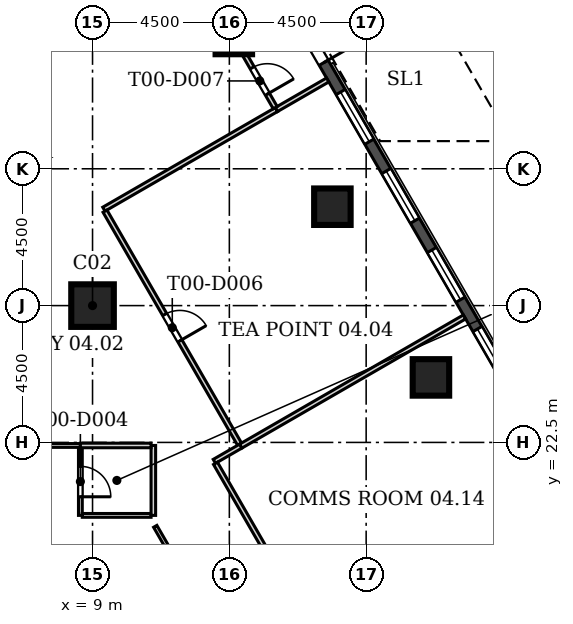
"""IFC4 building model, lengths in metres.
Left out: names, types, materials, properties, quantities, classifications, styles, units other than length and angle.
Written with IfcOpenShell. Run it as: python <this file> out.ifc"""

import sys

from ifc_helpers import new_model, si_unit, direction, frame, frame_2d, origin, origin_2d, place, context, subcontext, project, spatial, rectangle, hollow_rectangle, extrude, element, fill, save


model = new_model("IFC4")
c1 = context("Model", 3, precision=1e-05, world=origin(), true_north=direction((0.0, 1.0)))
c2 = subcontext(c1, "Body", "Model", "MODEL_VIEW")
j1 = project(units=[si_unit("LENGTHUNIT", "METRE"), si_unit("PLANEANGLEUNIT", "RADIAN")], contexts=[c1])
p1 = place(None, origin())
s1 = spatial("IfcSite", under=j1, at=p1, CompositionType="ELEMENT")
p2 = place(p1, origin())
s2 = spatial("IfcBuilding", under=s1, at=p2, CompositionType="ELEMENT")
p3 = place(p2, frame((0.0, 0.0, 25.0)))
s3 = spatial("IfcBuildingStorey", under=s2, at=p3, CompositionType="ELEMENT", Elevation=25.0)
for number, where, z_axis, x_axis in (
    (1, (20.131, 24.638, 0.0), (0.0, 0.0, 1.0), (1.0, 0.0, 0.0)),
    (2, (16.889, 30.253, 0.0), (0.0, 0.0, 1.0), (1.0, 0.0, 0.0)),
    (3, (13.648, 35.868, 0.0), (0.0, 0.0, 1.0), (1.0, 0.0, 0.0)),
):
    element("IfcColumn", number, at=place(p3, frame(where, z_axis=z_axis, x_axis=x_axis)), inside=s3, PredefinedType="COLUMN", context=c2, shape_type="SweptSolid", body=[
        extrude(rectangle(XDim=1.2, YDim=1.2, at=origin_2d()), origin(), (0.0, 0.0, 1.0), 4.5),
    ])
p4 = place(p3, frame((9.0, 27.0, 0.0), z_axis=(0.0, 0.0, 1.0), x_axis=(1.0, 0.0, 0.0)))
e4 = element("IfcColumn", 4, at=p4, inside=s3, PredefinedType="COLUMN", context=c2, shape_type="SweptSolid", body=[
    extrude(rectangle(XDim=1.4, YDim=1.4, at=origin_2d()), origin(), (0.0, 0.0, 1.0), 4.5),
])
p5 = place(p3, frame((32.353, 7.709, 0.0), z_axis=(0.0, 0.0, 1.0), x_axis=(-0.500000836325, 0.866024920931, 0.0)))
e5 = element("IfcWall", 5, at=p5, inside=s3, PredefinedType="SOLIDWALL", context=c2, shape_type="SweptSolid", body=[
    extrude(rectangle(XDim=56.0, YDim=0.34, at=frame_2d((28.0, 0.0))), origin(), (0.0, 0.0, 1.0), 4.2),
])
p6 = place(p5, frame((1.5, 0.0, 0.9)))
e6 = element("IfcOpeningElement", 6, at=p6, cuts=e5, PredefinedType="OPENING", context=c2, shape_type="SweptSolid", body=[
    extrude(rectangle(XDim=1.885, YDim=3.0, at=frame_2d((0.942, 1.5))), frame((0.0, 0.18, 0.0), z_axis=(0.0, -1.0, 0.0), x_axis=(1.0, 0.0, 0.0)), (0.0, 0.0, 1.0), 0.36),
])
p7 = place(p5, frame((4.5, 0.0, 0.9)))
e7 = element("IfcOpeningElement", 7, at=p7, cuts=e5, PredefinedType="OPENING", context=c2, shape_type="SweptSolid", body=[
    extrude(rectangle(XDim=1.885, YDim=3.0, at=frame_2d((0.942, 1.5))), frame((0.0, 0.18, 0.0), z_axis=(0.0, -1.0, 0.0), x_axis=(1.0, 0.0, 0.0)), (0.0, 0.0, 1.0), 0.36),
])
p8 = place(p5, frame((7.5, 0.0, 0.9)))
e8 = element("IfcOpeningElement", 8, at=p8, cuts=e5, PredefinedType="OPENING", context=c2, shape_type="SweptSolid", body=[
    extrude(rectangle(XDim=1.885, YDim=3.0, at=frame_2d((0.942, 1.5))), frame((0.0, 0.18, 0.0), z_axis=(0.0, -1.0, 0.0), x_axis=(1.0, 0.0, 0.0)), (0.0, 0.0, 1.0), 0.36),
])
p9 = place(p5, frame((10.5, 0.0, 0.9)))
e9 = element("IfcOpeningElement", 9, at=p9, cuts=e5, PredefinedType="OPENING", context=c2, shape_type="SweptSolid", body=[
    extrude(rectangle(XDim=1.885, YDim=3.0, at=frame_2d((0.942, 1.5))), frame((0.0, 0.18, 0.0), z_axis=(0.0, -1.0, 0.0), x_axis=(1.0, 0.0, 0.0)), (0.0, 0.0, 1.0), 0.36),
])
p10 = place(p5, frame((13.5, 0.0, 0.9)))
e10 = element("IfcOpeningElement", 10, at=p10, cuts=e5, PredefinedType="OPENING", context=c2, shape_type="SweptSolid", body=[
    extrude(rectangle(XDim=1.885, YDim=3.0, at=frame_2d((0.942, 1.5))), frame((0.0, 0.18, 0.0), z_axis=(0.0, -1.0, 0.0), x_axis=(1.0, 0.0, 0.0)), (0.0, 0.0, 1.0), 0.36),
])
p11 = place(p5, frame((16.5, 0.0, 0.9)))
e11 = element("IfcOpeningElement", 11, at=p11, cuts=e5, PredefinedType="OPENING", context=c2, shape_type="SweptSolid", body=[
    extrude(rectangle(XDim=1.885, YDim=3.0, at=frame_2d((0.942, 1.5))), frame((0.0, 0.18, 0.0), z_axis=(0.0, -1.0, 0.0), x_axis=(1.0, 0.0, 0.0)), (0.0, 0.0, 1.0), 0.36),
])
p12 = place(p5, frame((19.5, 0.0, 0.9)))
e12 = element("IfcOpeningElement", 12, at=p12, cuts=e5, PredefinedType="OPENING", context=c2, shape_type="SweptSolid", body=[
    extrude(rectangle(XDim=1.885, YDim=3.0, at=frame_2d((0.942, 1.5))), frame((0.0, 0.18, 0.0), z_axis=(0.0, -1.0, 0.0), x_axis=(1.0, 0.0, 0.0)), (0.0, 0.0, 1.0), 0.36),
])
p13 = place(p5, frame((22.5, 0.0, 0.9)))
e13 = element("IfcOpeningElement", 13, at=p13, cuts=e5, PredefinedType="OPENING", context=c2, shape_type="SweptSolid", body=[
    extrude(rectangle(XDim=1.885, YDim=3.0, at=frame_2d((0.942, 1.5))), frame((0.0, 0.18, 0.0), z_axis=(0.0, -1.0, 0.0), x_axis=(1.0, 0.0, 0.0)), (0.0, 0.0, 1.0), 0.36),
])
p14 = place(p5, frame((25.5, 0.0, 0.9)))
e14 = element("IfcOpeningElement", 14, at=p14, cuts=e5, PredefinedType="OPENING", context=c2, shape_type="SweptSolid", body=[
    extrude(rectangle(XDim=1.885, YDim=3.0, at=frame_2d((0.942, 1.5))), frame((0.0, 0.18, 0.0), z_axis=(0.0, -1.0, 0.0), x_axis=(1.0, 0.0, 0.0)), (0.0, 0.0, 1.0), 0.36),
])
p15 = place(p5, frame((28.5, 0.0, 0.9)))
e15 = element("IfcOpeningElement", 15, at=p15, cuts=e5, PredefinedType="OPENING", context=c2, shape_type="SweptSolid", body=[
    extrude(rectangle(XDim=1.885, YDim=3.0, at=frame_2d((0.942, 1.5))), frame((0.0, 0.18, 0.0), z_axis=(0.0, -1.0, 0.0), x_axis=(1.0, 0.0, 0.0)), (0.0, 0.0, 1.0), 0.36),
])
p16 = place(p5, frame((31.5, 0.0, 0.0)))
e16 = element("IfcOpeningElement", 16, at=p16, cuts=e5, PredefinedType="OPENING", context=c2, shape_type="SweptSolid", body=[
    extrude(rectangle(XDim=1.885, YDim=2.6, at=frame_2d((0.942, 1.3))), frame((0.0, 0.18, 0.0), z_axis=(0.0, -1.0, 0.0), x_axis=(1.0, 0.0, 0.0)), (0.0, 0.0, 1.0), 0.36),
])
p17 = place(p5, frame((34.5, 0.0, 0.9)))
e17 = element("IfcOpeningElement", 17, at=p17, cuts=e5, PredefinedType="OPENING", context=c2, shape_type="SweptSolid", body=[
    extrude(rectangle(XDim=1.885, YDim=3.0, at=frame_2d((0.942, 1.5))), frame((0.0, 0.18, 0.0), z_axis=(0.0, -1.0, 0.0), x_axis=(1.0, 0.0, 0.0)), (0.0, 0.0, 1.0), 0.36),
])
p18 = place(p5, frame((37.5, 0.0, 0.9)))
e18 = element("IfcOpeningElement", 18, at=p18, cuts=e5, PredefinedType="OPENING", context=c2, shape_type="SweptSolid", body=[
    extrude(rectangle(XDim=1.885, YDim=3.0, at=frame_2d((0.942, 1.5))), frame((0.0, 0.18, 0.0), z_axis=(0.0, -1.0, 0.0), x_axis=(1.0, 0.0, 0.0)), (0.0, 0.0, 1.0), 0.36),
])
p19 = place(p5, frame((40.5, 0.0, 0.9)))
e19 = element("IfcOpeningElement", 19, at=p19, cuts=e5, PredefinedType="OPENING", context=c2, shape_type="SweptSolid", body=[
    extrude(rectangle(XDim=1.885, YDim=3.0, at=frame_2d((0.942, 1.5))), frame((0.0, 0.18, 0.0), z_axis=(0.0, -1.0, 0.0), x_axis=(1.0, 0.0, 0.0)), (0.0, 0.0, 1.0), 0.36),
])
p20 = place(p5, frame((43.5, 0.0, 0.9)))
e20 = element("IfcOpeningElement", 20, at=p20, cuts=e5, PredefinedType="OPENING", context=c2, shape_type="SweptSolid", body=[
    extrude(rectangle(XDim=1.885, YDim=3.0, at=frame_2d((0.942, 1.5))), frame((0.0, 0.18, 0.0), z_axis=(0.0, -1.0, 0.0), x_axis=(1.0, 0.0, 0.0)), (0.0, 0.0, 1.0), 0.36),
])
p21 = place(p5, frame((46.5, 0.0, 0.9)))
e21 = element("IfcOpeningElement", 21, at=p21, cuts=e5, PredefinedType="OPENING", context=c2, shape_type="SweptSolid", body=[
    extrude(rectangle(XDim=1.885, YDim=3.0, at=frame_2d((0.942, 1.5))), frame((0.0, 0.18, 0.0), z_axis=(0.0, -1.0, 0.0), x_axis=(1.0, 0.0, 0.0)), (0.0, 0.0, 1.0), 0.36),
])
p22 = place(p5, frame((49.5, 0.0, 0.9)))
e22 = element("IfcOpeningElement", 22, at=p22, cuts=e5, PredefinedType="OPENING", context=c2, shape_type="SweptSolid", body=[
    extrude(rectangle(XDim=1.885, YDim=3.0, at=frame_2d((0.942, 1.5))), frame((0.0, 0.18, 0.0), z_axis=(0.0, -1.0, 0.0), x_axis=(1.0, 0.0, 0.0)), (0.0, 0.0, 1.0), 0.36),
])
p23 = place(p5, frame((52.5, 0.0, 0.9)))
e23 = element("IfcOpeningElement", 23, at=p23, cuts=e5, PredefinedType="OPENING", context=c2, shape_type="SweptSolid", body=[
    extrude(rectangle(XDim=1.885, YDim=3.0, at=frame_2d((0.942, 1.5))), frame((0.0, 0.18, 0.0), z_axis=(0.0, -1.0, 0.0), x_axis=(1.0, 0.0, 0.0)), (0.0, 0.0, 1.0), 0.36),
])
p24 = place(p2, frame((0.0, 0.0, 20.0)))
s4 = spatial("IfcBuildingStorey", under=s2, at=p24, CompositionType="ELEMENT", Elevation=20.0)
for number, where, z_axis, x_axis in (
    (24, (18.623, 32.69, 5.0), (0.0, 0.0, 1.0), (1.0, 0.0, 0.0)),
    (25, (22.158, 32.76, 5.0), (0.0, 0.0, 1.0), (1.0, 0.0, 0.0)),
):
    element("IfcColumn", number, at=place(p24, frame(where, z_axis=z_axis, x_axis=x_axis)), inside=s4, PredefinedType="COLUMN", context=c2, shape_type="SweptSolid", body=[
        extrude(hollow_rectangle(XDim=0.25, YDim=0.25, WallThickness=0.012, at=origin_2d()), origin(), (0.0, 0.0, 1.0), 3.6),
    ])
p25 = place(p3, frame((11.062, 19.74, 0.0), z_axis=(0.0, 0.0, 1.0), x_axis=(0.499995462694, -0.866028023383, 0.0)))
e26 = element("IfcWall", 26, at=p25, inside=s3, PredefinedType="PARTITIONING", context=c2, shape_type="SweptSolid", body=[
    extrude(rectangle(XDim=9.444, YDim=0.125, at=frame_2d((4.722, 0.0))), origin(), (0.0, 0.0, 1.0), 4.2),
])
p26 = place(p25, frame((5.121, 0.0, 0.0)))
e27 = element("IfcOpeningElement", 27, at=p26, cuts=e26, PredefinedType="OPENING", context=c2, shape_type="SweptSolid", body=[
    extrude(rectangle(XDim=1.8, YDim=2.1, at=frame_2d((0.9, 1.05))), frame((0.0, 0.073, 0.0), z_axis=(0.0, -1.0, 0.0), x_axis=(1.0, 0.0, 0.0)), (0.0, 0.0, 1.0), 0.145),
])
p27 = place(p3, frame((-10.938, 22.4, 0.0), z_axis=(0.0, 0.0, 1.0), x_axis=(1.0, 0.0, 0.0)))
e28 = element("IfcWall", 28, at=p27, inside=s3, PredefinedType="PARTITIONING", context=c2, shape_type="SweptSolid", body=[
    extrude(rectangle(XDim=19.538, YDim=0.125, at=frame_2d((9.769, 0.0))), origin(), (0.0, 0.0, 1.0), 4.2),
])
p28 = place(p27, frame((8.869, 0.0, 0.0)))
e29 = element("IfcOpeningElement", 29, at=p28, cuts=e28, PredefinedType="OPENING", context=c2, shape_type="SweptSolid", body=[
    extrude(rectangle(XDim=1.8, YDim=2.1, at=frame_2d((0.9, 1.05))), frame((0.0, 0.073, 0.0), z_axis=(0.0, -1.0, 0.0), x_axis=(1.0, 0.0, 0.0)), (0.0, 0.0, 1.0), 0.145),
])
p29 = place(p3, frame((8.6, 22.324, 0.0), z_axis=(0.0, 0.0, 1.0), x_axis=(0.0, -1.0, 0.0)))
e30 = element("IfcWall", 30, at=p29, inside=s3, PredefinedType="PARTITIONING", context=c2, shape_type="SweptSolid", body=[
    extrude(rectangle(XDim=2.224, YDim=0.125, at=frame_2d((1.112, 0.0))), origin(), (0.0, 0.0, 1.0), 4.2),
])
p30 = place(p29, frame((0.612, 0.0, 0.0)))
e31 = element("IfcOpeningElement", 31, at=p30, cuts=e30, PredefinedType="OPENING", context=c2, shape_type="SweptSolid", body=[
    extrude(rectangle(XDim=1.0, YDim=2.1, at=frame_2d((0.5, 1.05))), frame((0.0, 0.073, 0.0), z_axis=(0.0, -1.0, 0.0), x_axis=(1.0, 0.0, 0.0)), (0.0, 0.0, 1.0), 0.145),
])
p31 = place(p3, frame((8.663, 20.1, 0.0), z_axis=(0.0, 0.0, 1.0), x_axis=(1.0, 0.0, 0.0)))
e32 = element("IfcWall", 32, at=p31, inside=s3, PredefinedType="PARTITIONING", context=c2, shape_type="SweptSolid", body=[
    extrude(rectangle(XDim=2.262, YDim=0.125, at=frame_2d((1.131, 0.0))), origin(), (0.0, 0.0, 1.0), 4.2),
])
p32 = place(p3, frame((15.046, 33.446, 0.0), z_axis=(0.0, 0.0, 1.0), x_axis=(0.866054235095, 0.49995005938, 0.0)))
e33 = element("IfcWall", 33, at=p32, inside=s3, PredefinedType="PARTITIONING", context=c2, shape_type="SweptSolid", body=[
    extrude(rectangle(XDim=1.95, YDim=0.15, at=frame_2d((0.975, 0.0))), origin(), (0.0, 0.0, 1.0), 4.2),
])
p33 = place(p3, frame((9.373, 30.171, 0.0), z_axis=(0.0, 0.0, 1.0), x_axis=(0.866021102686, 0.500007449647, 0.0)))
e34 = element("IfcWall", 34, at=p33, inside=s3, PredefinedType="PARTITIONING", context=c2, shape_type="SweptSolid", body=[
    extrude(rectangle(XDim=6.55, YDim=0.15, at=frame_2d((3.275, 0.0))), origin(), (0.0, 0.0, 1.0), 4.2),
])
p34 = place(p3, frame((13.836, 22.442, 0.0), z_axis=(0.0, 0.0, 1.0), x_axis=(-0.500005027614, 0.86602250107, 0.0)))
e35 = element("IfcWall", 35, at=p34, inside=s3, PredefinedType="PARTITIONING", context=c2, shape_type="SweptSolid", body=[
    extrude(rectangle(XDim=8.85, YDim=0.15, at=frame_2d((4.425, 0.0))), origin(), (0.0, 0.0, 1.0), 4.2),
])
p35 = place(p34, frame((3.925, 0.0, 0.0)))
e36 = element("IfcOpeningElement", 36, at=p35, cuts=e35, PredefinedType="OPENING", context=c2, shape_type="SweptSolid", body=[
    extrude(rectangle(XDim=1.0, YDim=2.1, at=frame_2d((0.5, 1.05))), frame((0.0, 0.085, 0.0), z_axis=(0.0, -1.0, 0.0), x_axis=(1.0, 0.0, 0.0)), (0.0, 0.0, 1.0), 0.17),
])
p36 = place(p3, frame((21.234, 26.627, 0.0), z_axis=(0.0, 0.0, 1.0), x_axis=(-0.866028703517, -0.499994284652, 0.0)))
e37 = element("IfcWall", 37, at=p36, inside=s3, PredefinedType="PARTITIONING", context=c2, shape_type="SweptSolid", body=[
    extrude(rectangle(XDim=8.5, YDim=0.15, at=frame_2d((4.25, 0.0))), origin(), (0.0, 0.0, 1.0), 4.2),
])
p37 = place(p3, frame((15.008, 33.511, 0.0), z_axis=(0.0, 0.0, 1.0), x_axis=(-0.500048947491, 0.865997142093, 0.0)))
e38 = element("IfcWall", 38, at=p37, inside=s3, PredefinedType="PARTITIONING", context=c2, shape_type="SweptSolid", body=[
    extrude(rectangle(XDim=2.028, YDim=0.15, at=frame_2d((1.014, 0.0))), origin(), (0.0, 0.0, 1.0), 3.4),
])
p38 = place(p37, frame((0.514, 0.0, 0.0)))
e39 = element("IfcOpeningElement", 39, at=p38, cuts=e38, PredefinedType="OPENING", context=c2, shape_type="SweptSolid", body=[
    extrude(rectangle(XDim=1.0, YDim=2.1, at=frame_2d((0.5, 1.05))), frame((0.0, 0.085, 0.0), z_axis=(0.0, -1.0, 0.0), x_axis=(1.0, 0.0, 0.0)), (0.0, 0.0, 1.0), 0.17),
])
p39 = place(p3, frame((13.873, 22.377, 0.0), z_axis=(0.0, 0.0, 1.0), x_axis=(-0.866010750942, -0.50002537861, 0.0)))
e40 = element("IfcWall", 40, at=p39, inside=s3, PredefinedType="PARTITIONING", context=c2, shape_type="SweptSolid", body=[
    extrude(rectangle(XDim=1.0, YDim=0.15, at=frame_2d((0.5, 0.0))), origin(), (0.0, 0.0, 1.0), 4.2),
])
p40 = place(p3, frame((13.045, 21.812, 0.0), z_axis=(0.0, 0.0, 1.0), x_axis=(0.499994727438, -0.866028447878, 0.0)))
e41 = element("IfcWall", 41, at=p40, inside=s3, PredefinedType="PARTITIONING", context=c2, shape_type="SweptSolid", body=[
    extrude(rectangle(XDim=11.85, YDim=0.15, at=frame_2d((5.925, 0.0))), origin(), (0.0, 0.0, 1.0), 4.2),
])
p41 = place(p40, frame((5.425, 0.0, 0.0)))
e42 = element("IfcOpeningElement", 42, at=p41, cuts=e41, PredefinedType="OPENING", context=c2, shape_type="SweptSolid", body=[
    extrude(rectangle(XDim=1.0, YDim=2.1, at=frame_2d((0.5, 1.05))), frame((0.0, 0.085, 0.0), z_axis=(0.0, -1.0, 0.0), x_axis=(1.0, 0.0, 0.0)), (0.0, 0.0, 1.0), 0.17),
])
p42 = place(p3, frame((11.0, 20.1, 0.0), z_axis=(0.0, 0.0, 1.0), x_axis=(0.0, 1.0, 0.0)))
e43 = element("IfcWall", 43, at=p42, inside=s3, PredefinedType="PARTITIONING", context=c2, shape_type="SweptSolid", body=[
    extrude(rectangle(XDim=2.3, YDim=0.15, at=frame_2d((1.15, 0.0))), origin(), (0.0, 0.0, 1.0), 4.2),
])
p43 = place(p3, frame((10.925, 22.4, 0.0), z_axis=(0.0, 0.0, 1.0), x_axis=(-1.0, 0.0, 0.0)))
e44 = element("IfcWall", 44, at=p43, inside=s3, PredefinedType="PARTITIONING", context=c2, shape_type="SweptSolid", body=[
    extrude(rectangle(XDim=2.325, YDim=0.15, at=frame_2d((1.163, 0.0))), origin(), (0.0, 0.0, 1.0), 4.2),
])
p44 = place(p12, origin())
e45 = element("IfcWindow", 45, at=p44, inside=s3, PartitioningType="SINGLE_PANEL", PredefinedType="WINDOW", context=c2, shape_type="SweptSolid", body=[
    extrude(rectangle(XDim=1.885, YDim=3.0, at=frame_2d((0.942, 1.5))), frame((0.0, 0.11, 0.0), z_axis=(0.0, -1.0, 0.0), x_axis=(1.0, 0.0, 0.0)), (0.0, 0.0, 1.0), 0.06),
])
fill(e12, e45)
p45 = place(p13, origin())
e46 = element("IfcWindow", 46, at=p45, inside=s3, PartitioningType="SINGLE_PANEL", PredefinedType="WINDOW", context=c2, shape_type="SweptSolid", body=[
    extrude(rectangle(XDim=1.885, YDim=3.0, at=frame_2d((0.942, 1.5))), frame((0.0, 0.11, 0.0), z_axis=(0.0, -1.0, 0.0), x_axis=(1.0, 0.0, 0.0)), (0.0, 0.0, 1.0), 0.06),
])
fill(e13, e46)
p46 = place(p14, origin())
e47 = element("IfcWindow", 47, at=p46, inside=s3, PartitioningType="SINGLE_PANEL", PredefinedType="WINDOW", context=c2, shape_type="SweptSolid", body=[
    extrude(rectangle(XDim=1.885, YDim=3.0, at=frame_2d((0.942, 1.5))), frame((0.0, 0.11, 0.0), z_axis=(0.0, -1.0, 0.0), x_axis=(1.0, 0.0, 0.0)), (0.0, 0.0, 1.0), 0.06),
])
fill(e14, e47)
p47 = place(p15, origin())
e48 = element("IfcWindow", 48, at=p47, inside=s3, PartitioningType="SINGLE_PANEL", PredefinedType="WINDOW", context=c2, shape_type="SweptSolid", body=[
    extrude(rectangle(XDim=1.885, YDim=3.0, at=frame_2d((0.942, 1.5))), frame((0.0, 0.11, 0.0), z_axis=(0.0, -1.0, 0.0), x_axis=(1.0, 0.0, 0.0)), (0.0, 0.0, 1.0), 0.06),
])
fill(e15, e48)
p48 = place(p16, frame((1.885, 0.0, 0.0), z_axis=(0.0, 0.0, 1.0), x_axis=(-1.0, 0.0, 0.0)))
e49 = element("IfcDoor", 49, at=p48, inside=s3, OperationType="DOUBLE_DOOR_SINGLE_SWING", PredefinedType="DOOR", context=c2, shape_type="SweptSolid", body=[
    extrude(rectangle(XDim=1.885, YDim=2.6, at=frame_2d((0.942, 1.3))), frame((0.0, 0.025, 0.0), z_axis=(0.0, -1.0, 0.0), x_axis=(1.0, 0.0, 0.0)), (0.0, 0.0, 1.0), 0.05),
])
fill(e16, e49)
p49 = place(p3, frame((0.0, 0.0, 4.0)))
p50 = place(p49, frame((19.305, 34.41, 0.0)))
p51 = place(p50, frame((0.0, 0.0, 0.15)))
e50 = element("IfcWindow", 50, at=p51, inside=s3, PartitioningType="SINGLE_PANEL", PredefinedType="SKYLIGHT", context=c2, shape_type="SweptSolid", body=[
    extrude(rectangle(XDim=1.2, YDim=2.4, at=origin_2d()), origin(), (0.0, 0.0, 1.0), 0.05),
])
p52 = place(p30, origin())
e51 = element("IfcDoor", 51, at=p52, inside=s3, OperationType="SINGLE_SWING_RIGHT", PredefinedType="DOOR", context=c2, shape_type="SweptSolid", body=[
    extrude(rectangle(XDim=1.0, YDim=2.1, at=frame_2d((0.5, 1.05))), frame((0.0, 0.025, 0.0), z_axis=(0.0, -1.0, 0.0), x_axis=(1.0, 0.0, 0.0)), (0.0, 0.0, 1.0), 0.05),
])
fill(e31, e51)
p53 = place(p35, frame((1.0, 0.0, 0.0), z_axis=(0.0, 0.0, 1.0), x_axis=(-1.0, 0.0, 0.0)))
e52 = element("IfcDoor", 52, at=p53, inside=s3, OperationType="SINGLE_SWING_RIGHT", PredefinedType="DOOR", context=c2, shape_type="SweptSolid", body=[
    extrude(rectangle(XDim=1.0, YDim=2.1, at=frame_2d((0.5, 1.05))), frame((0.0, 0.025, 0.0), z_axis=(0.0, -1.0, 0.0), x_axis=(1.0, 0.0, 0.0)), (0.0, 0.0, 1.0), 0.05),
])
fill(e36, e52)
p54 = place(p38, frame((1.0, 0.0, 0.0), z_axis=(0.0, 0.0, 1.0), x_axis=(-1.0, 0.0, 0.0)))
e53 = element("IfcDoor", 53, at=p54, inside=s3, OperationType="SINGLE_SWING_RIGHT", PredefinedType="DOOR", context=c2, shape_type="SweptSolid", body=[
    extrude(rectangle(XDim=1.0, YDim=2.1, at=frame_2d((0.5, 1.05))), frame((0.0, 0.025, 0.0), z_axis=(0.0, -1.0, 0.0), x_axis=(1.0, 0.0, 0.0)), (0.0, 0.0, 1.0), 0.05),
])
fill(e39, e53)
save(model, sys.argv[1])
